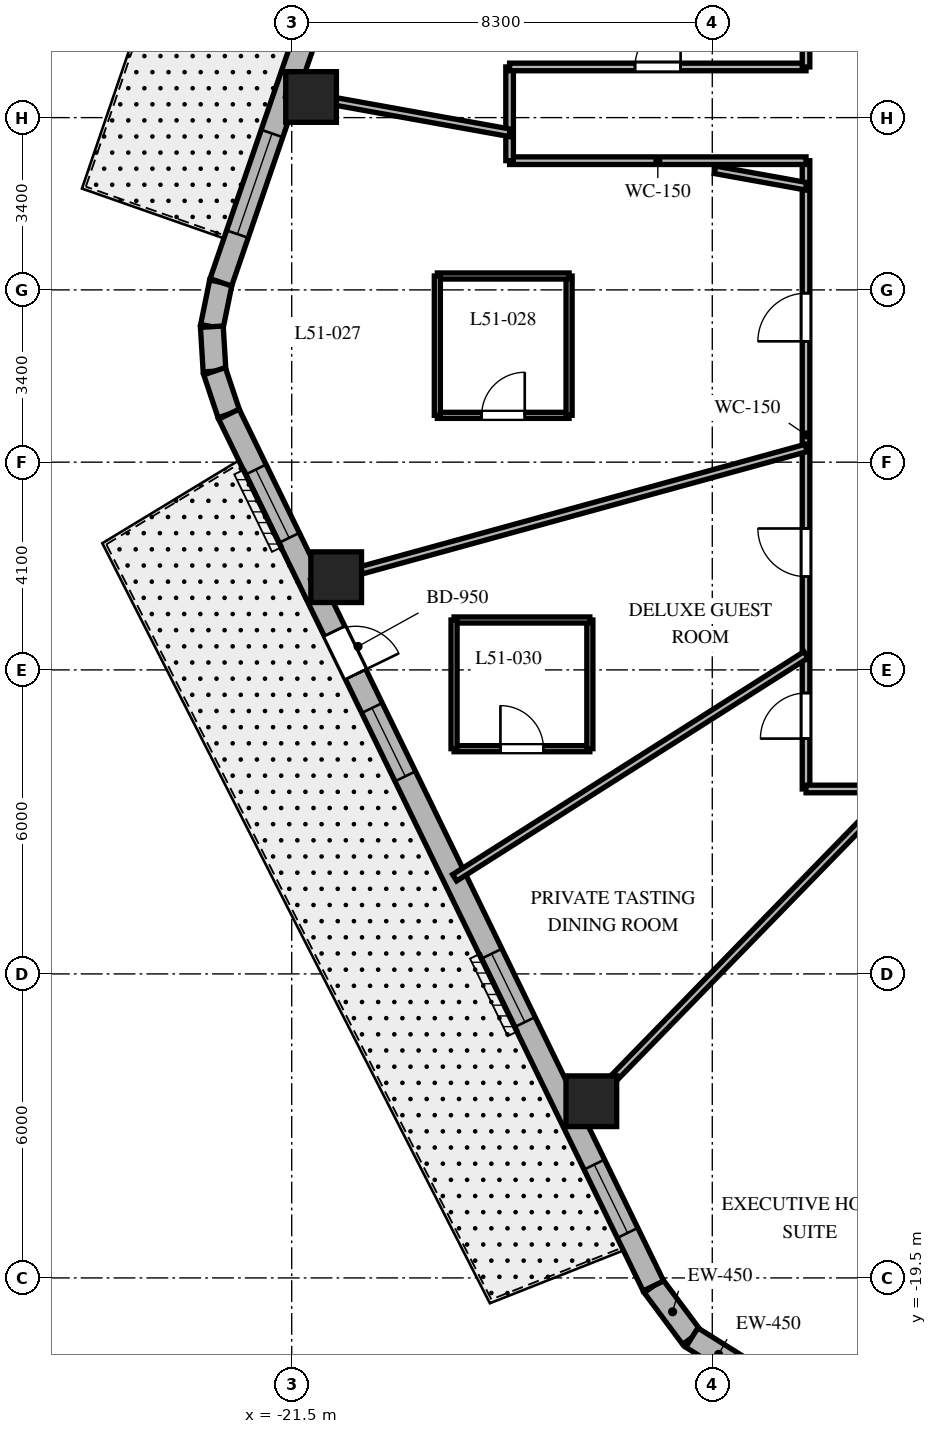
"""IFC4 building model, lengths in metres.
Left out: names, types, materials, properties, quantities, classifications, styles, units other than length and angle.
Written with IfcOpenShell. Run it as: python <this file> out.ifc"""

import sys

from ifc_helpers import new_model, si_unit, direction, frame, frame_2d, origin, origin_2d, place, context, subcontext, project, spatial, rectangle, extrude, element, fill, save


model = new_model("IFC4")
c1 = context("Model", 3, precision=1e-05, world=origin(), true_north=direction((0.0, 1.0)))
c2 = subcontext(c1, "Body", "Model", "MODEL_VIEW")
j1 = project(units=[si_unit("LENGTHUNIT", "METRE"), si_unit("PLANEANGLEUNIT", "RADIAN")], contexts=[c1])
p1 = place(None, origin())
s1 = spatial("IfcSite", under=j1, at=p1, CompositionType="ELEMENT")
p2 = place(p1, origin())
s2 = spatial("IfcBuilding", under=s1, at=p2, CompositionType="ELEMENT")
p3 = place(p2, frame((0.0, 0.0, 206.5)))
s3 = spatial("IfcBuildingStorey", under=s2, at=p3, CompositionType="ELEMENT", Elevation=206.5)
for number, where, z_axis, x_axis in (
    (1, (-21.118, 3.807, 0.0), (0.0, 0.0, 1.0), (1.0, 0.0, 0.0)),
    (2, (-20.622, -5.67, 0.0), (0.0, 0.0, 1.0), (1.0, 0.0, 0.0)),
    (3, (-15.587, -16.013, 0.0), (0.0, 0.0, 1.0), (1.0, 0.0, 0.0)),
):
    element("IfcColumn", number, at=place(p3, frame(where, z_axis=z_axis, x_axis=x_axis)), inside=s3, PredefinedType="COLUMN", context=c2, shape_type="SweptSolid", body=[
        extrude(rectangle(XDim=1.0, YDim=1.0, at=origin_2d()), origin(), (0.0, 0.0, 1.0), 3.8),
    ])
p4 = place(p3, frame((-14.362, -19.658, 0.0), z_axis=(0.0, 0.0, 1.0), x_axis=(0.596642462792, -0.80250717853, 0.0)))
e4 = element("IfcWall", 4, at=p4, inside=s3, PredefinedType="SOLIDWALL", context=c2, shape_type="SweptSolid", body=[
    extrude(rectangle(XDim=1.27, YDim=0.45, at=frame_2d((0.635, 0.0))), origin(), (0.0, 0.0, 1.0), 3.5),
])
p5 = place(p3, frame((-13.604, -20.678, 0.0), z_axis=(0.0, 0.0, 1.0), x_axis=(0.847910404124, -0.53013955387, 0.0)))
e5 = element("IfcWall", 5, at=p5, inside=s3, PredefinedType="SOLIDWALL", context=c2, shape_type="SweptSolid", body=[
    extrude(rectangle(XDim=1.249, YDim=0.45, at=frame_2d((0.624, 0.0))), origin(), (0.0, 0.0, 1.0), 3.5),
])
p6 = place(p3, frame((-22.898, 0.15, 0.0), z_axis=(0.0, 0.0, 1.0), x_axis=(-0.199055826889, -0.979988151858, 0.0)))
e6 = element("IfcWall", 6, at=p6, inside=s3, PredefinedType="SOLIDWALL", context=c2, shape_type="SweptSolid", body=[
    extrude(rectangle(XDim=0.894, YDim=0.45, at=frame_2d((0.447, 0.0))), origin(), (0.0, 0.0, 1.0), 3.5),
])
p7 = place(p3, frame((-23.076, -0.727, 0.0), z_axis=(0.0, 0.0, 1.0), x_axis=(0.060805222108, -0.998149650586, 0.0)))
e7 = element("IfcWall", 7, at=p7, inside=s3, PredefinedType="SOLIDWALL", context=c2, shape_type="SweptSolid", body=[
    extrude(rectangle(XDim=0.879, YDim=0.45, at=frame_2d((0.44, 0.0))), origin(), (0.0, 0.0, 1.0), 3.5),
])
p8 = place(p3, frame((-23.023, -1.604, 0.0), z_axis=(0.0, 0.0, 1.0), x_axis=(0.316801227695, -0.948491951537, 0.0)))
e8 = element("IfcWall", 8, at=p8, inside=s3, PredefinedType="SOLIDWALL", context=c2, shape_type="SweptSolid", body=[
    extrude(rectangle(XDim=0.894, YDim=0.45, at=frame_2d((0.447, 0.0))), origin(), (0.0, 0.0, 1.0), 3.5),
])
p9 = place(p3, frame((-16.324, 19.275, 0.0), z_axis=(0.0, 0.0, 1.0), x_axis=(-0.325083142304, -0.945685439557, 0.0)))
e9 = element("IfcWall", 9, at=p9, inside=s3, PredefinedType="SOLIDWALL", context=c2, shape_type="SweptSolid", body=[
    extrude(rectangle(XDim=20.224, YDim=0.45, at=frame_2d((10.112, 0.0))), origin(), (0.0, 0.0, 1.0), 3.5),
])
p10 = place(p9, frame((5.062, 0.0, 0.0)))
e10 = element("IfcOpeningElement", 10, at=p10, cuts=e9, PredefinedType="OPENING", context=c2, shape_type="SweptSolid", body=[
    extrude(rectangle(XDim=1.0, YDim=2.15, at=frame_2d((0.5, 1.075))), frame((0.0, 0.235, 0.0), z_axis=(0.0, -1.0, 0.0), x_axis=(1.0, 0.0, 0.0)), (0.0, 0.0, 1.0), 0.47),
])
p11 = place(p9, frame((0.953, 0.0, 0.8)))
e11 = element("IfcOpeningElement", 11, at=p11, cuts=e9, PredefinedType="OPENING", context=c2, shape_type="SweptSolid", body=[
    extrude(rectangle(XDim=2.1, YDim=1.85, at=frame_2d((1.05, 0.925))), frame((0.0, 0.235, 0.0), z_axis=(0.0, -1.0, 0.0), x_axis=(1.0, 0.0, 0.0)), (0.0, 0.0, 1.0), 0.47),
])
p12 = place(p9, frame((6.604, 0.0, 0.8)))
e12 = element("IfcOpeningElement", 12, at=p12, cuts=e9, PredefinedType="OPENING", context=c2, shape_type="SweptSolid", body=[
    extrude(rectangle(XDim=2.1, YDim=1.85, at=frame_2d((1.05, 0.925))), frame((0.0, 0.235, 0.0), z_axis=(0.0, -1.0, 0.0), x_axis=(1.0, 0.0, 0.0)), (0.0, 0.0, 1.0), 0.47),
])
p13 = place(p9, frame((11.585, 0.0, 0.8)))
e13 = element("IfcOpeningElement", 13, at=p13, cuts=e9, PredefinedType="OPENING", context=c2, shape_type="SweptSolid", body=[
    extrude(rectangle(XDim=2.1, YDim=1.85, at=frame_2d((1.05, 0.925))), frame((0.0, 0.235, 0.0), z_axis=(0.0, -1.0, 0.0), x_axis=(1.0, 0.0, 0.0)), (0.0, 0.0, 1.0), 0.47),
])
p14 = place(p9, frame((17.118, 0.0, 0.8)))
e14 = element("IfcOpeningElement", 14, at=p14, cuts=e9, PredefinedType="OPENING", context=c2, shape_type="SweptSolid", body=[
    extrude(rectangle(XDim=2.1, YDim=1.85, at=frame_2d((1.05, 0.925))), frame((0.0, 0.235, 0.0), z_axis=(0.0, -1.0, 0.0), x_axis=(1.0, 0.0, 0.0)), (0.0, 0.0, 1.0), 0.47),
])
p15 = place(p3, frame((-22.74, -2.452, 0.0), z_axis=(0.0, 0.0, 1.0), x_axis=(0.437753424814, -0.899095066755, 0.0)))
e15 = element("IfcWall", 15, at=p15, inside=s3, PredefinedType="SOLIDWALL", context=c2, shape_type="SweptSolid", body=[
    extrude(rectangle(XDim=19.137, YDim=0.45, at=frame_2d((9.569, 0.0))), origin(), (0.0, 0.0, 1.0), 3.5),
])
p16 = place(p15, frame((4.763, 0.0, 0.0)))
e16 = element("IfcOpeningElement", 16, at=p16, cuts=e15, PredefinedType="OPENING", context=c2, shape_type="SweptSolid", body=[
    extrude(rectangle(XDim=0.95, YDim=2.15, at=frame_2d((0.475, 1.075))), frame((0.0, 0.235, 0.0), z_axis=(0.0, -1.0, 0.0), x_axis=(1.0, 0.0, 0.0)), (0.0, 0.0, 1.0), 0.47),
])
p17 = place(p15, frame((1.216, 0.0, 0.8)))
e17 = element("IfcOpeningElement", 17, at=p17, cuts=e15, PredefinedType="OPENING", context=c2, shape_type="SweptSolid", body=[
    extrude(rectangle(XDim=1.5, YDim=1.8, at=frame_2d((0.75, 0.9))), frame((0.0, 0.235, 0.0), z_axis=(0.0, -1.0, 0.0), x_axis=(1.0, 0.0, 0.0)), (0.0, 0.0, 1.0), 0.47),
])
p18 = place(p15, frame((6.451, 0.0, 0.8)))
e18 = element("IfcOpeningElement", 18, at=p18, cuts=e15, PredefinedType="OPENING", context=c2, shape_type="SweptSolid", body=[
    extrude(rectangle(XDim=1.5, YDim=1.8, at=frame_2d((0.75, 0.9))), frame((0.0, 0.235, 0.0), z_axis=(0.0, -1.0, 0.0), x_axis=(1.0, 0.0, 0.0)), (0.0, 0.0, 1.0), 0.47),
])
p19 = place(p15, frame((11.845, 0.0, 0.8)))
e19 = element("IfcOpeningElement", 19, at=p19, cuts=e15, PredefinedType="OPENING", context=c2, shape_type="SweptSolid", body=[
    extrude(rectangle(XDim=1.5, YDim=1.8, at=frame_2d((0.75, 0.9))), frame((0.0, 0.235, 0.0), z_axis=(0.0, -1.0, 0.0), x_axis=(1.0, 0.0, 0.0)), (0.0, 0.0, 1.0), 0.47),
])
p20 = place(p15, frame((16.473, 0.0, 0.8)))
e20 = element("IfcOpeningElement", 20, at=p20, cuts=e15, PredefinedType="OPENING", context=c2, shape_type="SweptSolid", body=[
    extrude(rectangle(XDim=1.5, YDim=1.8, at=frame_2d((0.75, 0.9))), frame((0.0, 0.235, 0.0), z_axis=(0.0, -1.0, 0.0), x_axis=(1.0, 0.0, 0.0)), (0.0, 0.0, 1.0), 0.47),
])
p21 = place(p3, frame((-11.35, -9.85, 0.0), z_axis=(0.0, 0.0, 1.0), x_axis=(0.0, 1.0, 0.0)))
e21 = element("IfcWall", 21, at=p21, inside=s3, PredefinedType="PARTITIONING", context=c2, shape_type="SweptSolid", body=[
    extrude(rectangle(XDim=12.4, YDim=0.15, at=frame_2d((6.2, 0.0))), origin(), (0.0, 0.0, 1.0), 2.99),
])
p22 = place(p21, frame((8.835, 0.0, 0.0)))
e22 = element("IfcOpeningElement", 22, at=p22, cuts=e21, PredefinedType="OPENING", context=c2, shape_type="SweptSolid", body=[
    extrude(rectangle(XDim=0.95, YDim=2.03, at=frame_2d((0.475, 1.015))), frame((0.0, 0.085, 0.0), z_axis=(0.0, -1.0, 0.0), x_axis=(1.0, 0.0, 0.0)), (0.0, 0.0, 1.0), 0.17),
])
p23 = place(p21, frame((4.191, 0.0, 0.0)))
e23 = element("IfcOpeningElement", 23, at=p23, cuts=e21, PredefinedType="OPENING", context=c2, shape_type="SweptSolid", body=[
    extrude(rectangle(XDim=0.95, YDim=2.03, at=frame_2d((0.475, 1.015))), frame((0.0, 0.085, 0.0), z_axis=(0.0, -1.0, 0.0), x_axis=(1.0, 0.0, 0.0)), (0.0, 0.0, 1.0), 0.17),
])
p24 = place(p21, frame((0.994, 0.0, 0.0)))
e24 = element("IfcOpeningElement", 24, at=p24, cuts=e21, PredefinedType="OPENING", context=c2, shape_type="SweptSolid", body=[
    extrude(rectangle(XDim=0.9, YDim=2.03, at=frame_2d((0.45, 1.015))), frame((0.0, 0.085, 0.0), z_axis=(0.0, -1.0, 0.0), x_axis=(1.0, 0.0, 0.0)), (0.0, 0.0, 1.0), 0.17),
])
p25 = place(p3, frame((-11.35, 2.55, 0.0), z_axis=(0.0, 0.0, 1.0), x_axis=(-1.0, 0.0, 0.0)))
e25 = element("IfcWall", 25, at=p25, inside=s3, PredefinedType="PARTITIONING", context=c2, shape_type="SweptSolid", body=[
    extrude(rectangle(XDim=5.85, YDim=0.15, at=frame_2d((2.925, 0.0))), origin(), (0.0, 0.0, 1.0), 2.94),
])
p26 = place(p3, frame((-17.2, 2.55, 0.0), z_axis=(0.0, 0.0, 1.0), x_axis=(0.0, 1.0, 0.0)))
e26 = element("IfcWall", 26, at=p26, inside=s3, PredefinedType="PARTITIONING", context=c2, shape_type="SweptSolid", body=[
    extrude(rectangle(XDim=1.85, YDim=0.15, at=frame_2d((0.925, 0.0))), origin(), (0.0, 0.0, 1.0), 2.94),
])
p27 = place(p3, frame((-17.2, 4.4, 0.0), z_axis=(0.0, 0.0, 1.0), x_axis=(1.0, 0.0, 0.0)))
e27 = element("IfcWall", 27, at=p27, inside=s3, PredefinedType="PARTITIONING", context=c2, shape_type="SweptSolid", body=[
    extrude(rectangle(XDim=5.85, YDim=0.15, at=frame_2d((2.925, 0.0))), origin(), (0.0, 0.0, 1.0), 2.94),
])
p28 = place(p27, frame((2.475, 0.0, 0.0)))
e28 = element("IfcOpeningElement", 28, at=p28, cuts=e27, PredefinedType="OPENING", context=c2, shape_type="SweptSolid", body=[
    extrude(rectangle(XDim=0.9, YDim=2.03, at=frame_2d((0.45, 1.015))), frame((0.0, 0.085, 0.0), z_axis=(0.0, -1.0, 0.0), x_axis=(1.0, 0.0, 0.0)), (0.0, 0.0, 1.0), 0.17),
])
p29 = place(p3, frame((-11.35, 4.4, 0.0), z_axis=(0.0, 0.0, 1.0), x_axis=(0.0, 1.0, 0.0)))
e29 = element("IfcWall", 29, at=p29, inside=s3, PredefinedType="PARTITIONING", context=c2, shape_type="SweptSolid", body=[
    extrude(rectangle(XDim=5.45, YDim=0.15, at=frame_2d((2.725, 0.0))), origin(), (0.0, 0.0, 1.0), 2.99),
])
p30 = place(p29, frame((2.955, 0.0, 0.0)))
e30 = element("IfcOpeningElement", 30, at=p30, cuts=e29, PredefinedType="OPENING", context=c2, shape_type="SweptSolid", body=[
    extrude(rectangle(XDim=0.9, YDim=2.03, at=frame_2d((0.45, 1.015))), frame((0.0, 0.085, 0.0), z_axis=(0.0, -1.0, 0.0), x_axis=(1.0, 0.0, 0.0)), (0.0, 0.0, 1.0), 0.17),
])
p31 = place(p3, frame((-0.92, -9.85, 0.0), z_axis=(0.0, 0.0, 1.0), x_axis=(-1.0, 0.0, 0.0)))
e31 = element("IfcWall", 31, at=p31, inside=s3, PredefinedType="PARTITIONING", context=c2, shape_type="SweptSolid", body=[
    extrude(rectangle(XDim=10.43, YDim=0.15, at=frame_2d((5.215, 0.0))), origin(), (0.0, 0.0, 1.0), 2.99),
])
p32 = place(p31, frame((4.949, 0.0, 0.0)))
e32 = element("IfcOpeningElement", 32, at=p32, cuts=e31, PredefinedType="OPENING", context=c2, shape_type="SweptSolid", body=[
    extrude(rectangle(XDim=0.95, YDim=2.03, at=frame_2d((0.475, 1.015))), frame((0.0, 0.085, 0.0), z_axis=(0.0, -1.0, 0.0), x_axis=(1.0, 0.0, 0.0)), (0.0, 0.0, 1.0), 0.17),
])
p33 = place(p3, frame((-11.35, 2.046, 0.0), z_axis=(0.0, 0.0, 1.0), x_axis=(-0.984127783205, 0.177461281195, 0.0)))
e33 = element("IfcWall", 33, at=p33, inside=s3, PredefinedType="PARTITIONING", context=c2, shape_type="SweptSolid", body=[
    extrude(rectangle(XDim=1.826, YDim=0.15, at=frame_2d((0.913, 0.0))), origin(), (0.0, 0.0, 1.0), 3.5),
])
p34 = place(p3, frame((-17.2, 3.101, 0.0), z_axis=(0.0, 0.0, 1.0), x_axis=(-0.98413465883, 0.177423147559, 0.0)))
e34 = element("IfcWall", 34, at=p34, inside=s3, PredefinedType="PARTITIONING", context=c2, shape_type="SweptSolid", body=[
    extrude(rectangle(XDim=4.482, YDim=0.15, at=frame_2d((2.241, 0.0))), origin(), (0.0, 0.0, 1.0), 2.74),
])
p35 = place(p3, frame((-11.35, -3.121, 0.0), z_axis=(0.0, 0.0, 1.0), x_axis=(-0.964212793822, -0.265129568758, 0.0)))
e35 = element("IfcWall", 35, at=p35, inside=s3, PredefinedType="PARTITIONING", context=c2, shape_type="SweptSolid", body=[
    extrude(rectangle(XDim=10.12, YDim=0.15, at=frame_2d((5.06, 0.0))), origin(), (0.0, 0.0, 1.0), 2.74),
])
p36 = place(p3, frame((-11.35, -7.202, 0.0), z_axis=(0.0, 0.0, 1.0), x_axis=(-0.844364592263, -0.535769013039, 0.0)))
e36 = element("IfcWall", 36, at=p36, inside=s3, PredefinedType="PARTITIONING", context=c2, shape_type="SweptSolid", body=[
    extrude(rectangle(XDim=8.213, YDim=0.15, at=frame_2d((4.106, 0.0))), origin(), (0.0, 0.0, 1.0), 2.74),
])
p37 = place(p3, frame((-9.588, -9.85, 0.0), z_axis=(0.0, 0.0, 1.0), x_axis=(-0.697519469595, -0.716565830567, 0.0)))
e37 = element("IfcWall", 37, at=p37, inside=s3, PredefinedType="PARTITIONING", context=c2, shape_type="SweptSolid", body=[
    extrude(rectangle(XDim=9.126, YDim=0.15, at=frame_2d((4.563, 0.0))), origin(), (0.0, 0.0, 1.0), 2.74),
])
p38 = place(p3, frame((-18.626, -2.476, 0.0), z_axis=(0.0, 0.0, 1.0), x_axis=(1.0, 0.0, 0.0)))
e38 = element("IfcWall", 38, at=p38, inside=s3, PredefinedType="PARTITIONING", context=c2, shape_type="SweptSolid", body=[
    extrude(rectangle(XDim=2.6, YDim=0.12, at=frame_2d((1.3, 0.0))), origin(), (0.0, 0.0, 1.0), 2.94),
])
p39 = place(p38, frame((0.875, 0.0, 0.0)))
e39 = element("IfcOpeningElement", 39, at=p39, cuts=e38, PredefinedType="OPENING", context=c2, shape_type="SweptSolid", body=[
    extrude(rectangle(XDim=0.85, YDim=2.03, at=frame_2d((0.425, 1.015))), frame((0.0, 0.07, 0.0), z_axis=(0.0, -1.0, 0.0), x_axis=(1.0, 0.0, 0.0)), (0.0, 0.0, 1.0), 0.14),
])
p40 = place(p3, frame((-16.026, -2.476, 0.0), z_axis=(0.0, 0.0, 1.0), x_axis=(0.0, 1.0, 0.0)))
e40 = element("IfcWall", 40, at=p40, inside=s3, PredefinedType="PARTITIONING", context=c2, shape_type="SweptSolid", body=[
    extrude(rectangle(XDim=2.75, YDim=0.12, at=frame_2d((1.375, 0.0))), origin(), (0.0, 0.0, 1.0), 3.5),
])
p41 = place(p3, frame((-16.026, 0.274, 0.0), z_axis=(0.0, 0.0, 1.0), x_axis=(-1.0, 0.0, 0.0)))
e41 = element("IfcWall", 41, at=p41, inside=s3, PredefinedType="PARTITIONING", context=c2, shape_type="SweptSolid", body=[
    extrude(rectangle(XDim=2.6, YDim=0.12, at=frame_2d((1.3, 0.0))), origin(), (0.0, 0.0, 1.0), 2.94),
])
p42 = place(p3, frame((-18.626, 0.274, 0.0), z_axis=(0.0, 0.0, 1.0), x_axis=(0.0, -1.0, 0.0)))
e42 = element("IfcWall", 42, at=p42, inside=s3, PredefinedType="PARTITIONING", context=c2, shape_type="SweptSolid", body=[
    extrude(rectangle(XDim=2.75, YDim=0.12, at=frame_2d((1.375, 0.0))), origin(), (0.0, 0.0, 1.0), 3.5),
])
p43 = place(p3, frame((-18.296, -9.055, 0.0), z_axis=(0.0, 0.0, 1.0), x_axis=(1.0, 0.0, 0.0)))
e43 = element("IfcWall", 43, at=p43, inside=s3, PredefinedType="PARTITIONING", context=c2, shape_type="SweptSolid", body=[
    extrude(rectangle(XDim=2.68, YDim=0.12, at=frame_2d((1.34, 0.0))), origin(), (0.0, 0.0, 1.0), 3.027),
])
p44 = place(p43, frame((0.915, 0.0, 0.0)))
e44 = element("IfcOpeningElement", 44, at=p44, cuts=e43, PredefinedType="OPENING", context=c2, shape_type="SweptSolid", body=[
    extrude(rectangle(XDim=0.85, YDim=2.03, at=frame_2d((0.425, 1.015))), frame((0.0, 0.07, 0.0), z_axis=(0.0, -1.0, 0.0), x_axis=(1.0, 0.0, 0.0)), (0.0, 0.0, 1.0), 0.14),
])
p45 = place(p3, frame((-15.616, -9.055, 0.0), z_axis=(0.0, 0.0, 1.0), x_axis=(0.0, 1.0, 0.0)))
e45 = element("IfcWall", 45, at=p45, inside=s3, PredefinedType="PARTITIONING", context=c2, shape_type="SweptSolid", body=[
    extrude(rectangle(XDim=2.54, YDim=0.12, at=frame_2d((1.27, 0.0))), origin(), (0.0, 0.0, 1.0), 2.99),
])
p46 = place(p3, frame((-15.616, -6.515, 0.0), z_axis=(0.0, 0.0, 1.0), x_axis=(-1.0, 0.0, 0.0)))
e46 = element("IfcWall", 46, at=p46, inside=s3, PredefinedType="PARTITIONING", context=c2, shape_type="SweptSolid", body=[
    extrude(rectangle(XDim=2.68, YDim=0.12, at=frame_2d((1.34, 0.0))), origin(), (0.0, 0.0, 1.0), 2.99),
])
p47 = place(p3, frame((-18.296, -6.515, 0.0), z_axis=(0.0, 0.0, 1.0), x_axis=(0.0, -1.0, 0.0)))
e47 = element("IfcWall", 47, at=p47, inside=s3, PredefinedType="PARTITIONING", context=c2, shape_type="SweptSolid", body=[
    extrude(rectangle(XDim=2.54, YDim=0.12, at=frame_2d((1.27, 0.0))), origin(), (0.0, 0.0, 1.0), 3.5),
])
p48 = place(p14, origin())
e48 = element("IfcWindow", 48, at=p48, inside=s3, PartitioningType="SINGLE_PANEL", PredefinedType="WINDOW", context=c2, shape_type="SweptSolid", body=[
    extrude(rectangle(XDim=2.1, YDim=1.85, at=frame_2d((1.05, 0.925))), frame((0.0, 0.03, 0.0), z_axis=(0.0, -1.0, 0.0), x_axis=(1.0, 0.0, 0.0)), (0.0, 0.0, 1.0), 0.06),
])
fill(e14, e48)
p49 = place(p16, origin())
e49 = element("IfcDoor", 49, at=p49, inside=s3, OperationType="SINGLE_SWING_RIGHT", PredefinedType="DOOR", context=c2, shape_type="SweptSolid", body=[
    extrude(rectangle(XDim=0.95, YDim=2.15, at=frame_2d((0.475, 1.075))), frame((0.0, 0.025, 0.0), z_axis=(0.0, -1.0, 0.0), x_axis=(1.0, 0.0, 0.0)), (0.0, 0.0, 1.0), 0.05),
])
fill(e16, e49)
p50 = place(p17, origin())
e50 = element("IfcWindow", 50, at=p50, inside=s3, PartitioningType="SINGLE_PANEL", PredefinedType="WINDOW", context=c2, shape_type="SweptSolid", body=[
    extrude(rectangle(XDim=1.5, YDim=1.8, at=frame_2d((0.75, 0.9))), frame((0.0, 0.03, 0.0), z_axis=(0.0, -1.0, 0.0), x_axis=(1.0, 0.0, 0.0)), (0.0, 0.0, 1.0), 0.06),
])
fill(e17, e50)
p51 = place(p18, origin())
e51 = element("IfcWindow", 51, at=p51, inside=s3, PartitioningType="SINGLE_PANEL", PredefinedType="WINDOW", context=c2, shape_type="SweptSolid", body=[
    extrude(rectangle(XDim=1.5, YDim=1.8, at=frame_2d((0.75, 0.9))), frame((0.0, 0.03, 0.0), z_axis=(0.0, -1.0, 0.0), x_axis=(1.0, 0.0, 0.0)), (0.0, 0.0, 1.0), 0.06),
])
fill(e18, e51)
p52 = place(p19, origin())
e52 = element("IfcWindow", 52, at=p52, inside=s3, PartitioningType="SINGLE_PANEL", PredefinedType="WINDOW", context=c2, shape_type="SweptSolid", body=[
    extrude(rectangle(XDim=1.5, YDim=1.8, at=frame_2d((0.75, 0.9))), frame((0.0, 0.03, 0.0), z_axis=(0.0, -1.0, 0.0), x_axis=(1.0, 0.0, 0.0)), (0.0, 0.0, 1.0), 0.06),
])
fill(e19, e52)
p53 = place(p20, origin())
e53 = element("IfcWindow", 53, at=p53, inside=s3, PartitioningType="SINGLE_PANEL", PredefinedType="WINDOW", context=c2, shape_type="SweptSolid", body=[
    extrude(rectangle(XDim=1.5, YDim=1.8, at=frame_2d((0.75, 0.9))), frame((0.0, 0.03, 0.0), z_axis=(0.0, -1.0, 0.0), x_axis=(1.0, 0.0, 0.0)), (0.0, 0.0, 1.0), 0.06),
])
fill(e20, e53)
p54 = place(p28, origin())
e54 = element("IfcDoor", 54, at=p54, inside=s3, OperationType="SINGLE_SWING_RIGHT", PredefinedType="DOOR", context=c2, shape_type="SweptSolid", body=[
    extrude(rectangle(XDim=0.9, YDim=2.03, at=frame_2d((0.45, 1.015))), frame((0.0, 0.025, 0.0), z_axis=(0.0, -1.0, 0.0), x_axis=(1.0, 0.0, 0.0)), (0.0, 0.0, 1.0), 0.05),
])
fill(e28, e54)
p55 = place(p22, origin())
e55 = element("IfcDoor", 55, at=p55, inside=s3, OperationType="SINGLE_SWING_LEFT", PredefinedType="DOOR", context=c2, shape_type="SweptSolid", body=[
    extrude(rectangle(XDim=0.95, YDim=2.03, at=frame_2d((0.475, 1.015))), frame((0.0, 0.025, 0.0), z_axis=(0.0, -1.0, 0.0), x_axis=(1.0, 0.0, 0.0)), (0.0, 0.0, 1.0), 0.05),
])
fill(e22, e55)
p56 = place(p39, origin())
e56 = element("IfcDoor", 56, at=p56, inside=s3, OperationType="SINGLE_SWING_RIGHT", PredefinedType="DOOR", context=c2, shape_type="SweptSolid", body=[
    extrude(rectangle(XDim=0.85, YDim=2.03, at=frame_2d((0.425, 1.015))), frame((0.0, 0.025, 0.0), z_axis=(0.0, -1.0, 0.0), x_axis=(1.0, 0.0, 0.0)), (0.0, 0.0, 1.0), 0.05),
])
fill(e39, e56)
p57 = place(p23, origin())
e57 = element("IfcDoor", 57, at=p57, inside=s3, OperationType="SINGLE_SWING_RIGHT", PredefinedType="DOOR", context=c2, shape_type="SweptSolid", body=[
    extrude(rectangle(XDim=0.95, YDim=2.03, at=frame_2d((0.475, 1.015))), frame((0.0, 0.025, 0.0), z_axis=(0.0, -1.0, 0.0), x_axis=(1.0, 0.0, 0.0)), (0.0, 0.0, 1.0), 0.05),
])
fill(e23, e57)
p58 = place(p44, origin())
e58 = element("IfcDoor", 58, at=p58, inside=s3, OperationType="SINGLE_SWING_LEFT", PredefinedType="DOOR", context=c2, shape_type="SweptSolid", body=[
    extrude(rectangle(XDim=0.85, YDim=2.03, at=frame_2d((0.425, 1.015))), frame((0.0, 0.025, 0.0), z_axis=(0.0, -1.0, 0.0), x_axis=(1.0, 0.0, 0.0)), (0.0, 0.0, 1.0), 0.05),
])
fill(e44, e58)
p59 = place(p24, origin())
e59 = element("IfcDoor", 59, at=p59, inside=s3, OperationType="SINGLE_SWING_LEFT", PredefinedType="DOOR", context=c2, shape_type="SweptSolid", body=[
    extrude(rectangle(XDim=0.9, YDim=2.03, at=frame_2d((0.45, 1.015))), frame((0.0, 0.025, 0.0), z_axis=(0.0, -1.0, 0.0), x_axis=(1.0, 0.0, 0.0)), (0.0, 0.0, 1.0), 0.05),
])
fill(e24, e59)
save(model, sys.argv[1])
